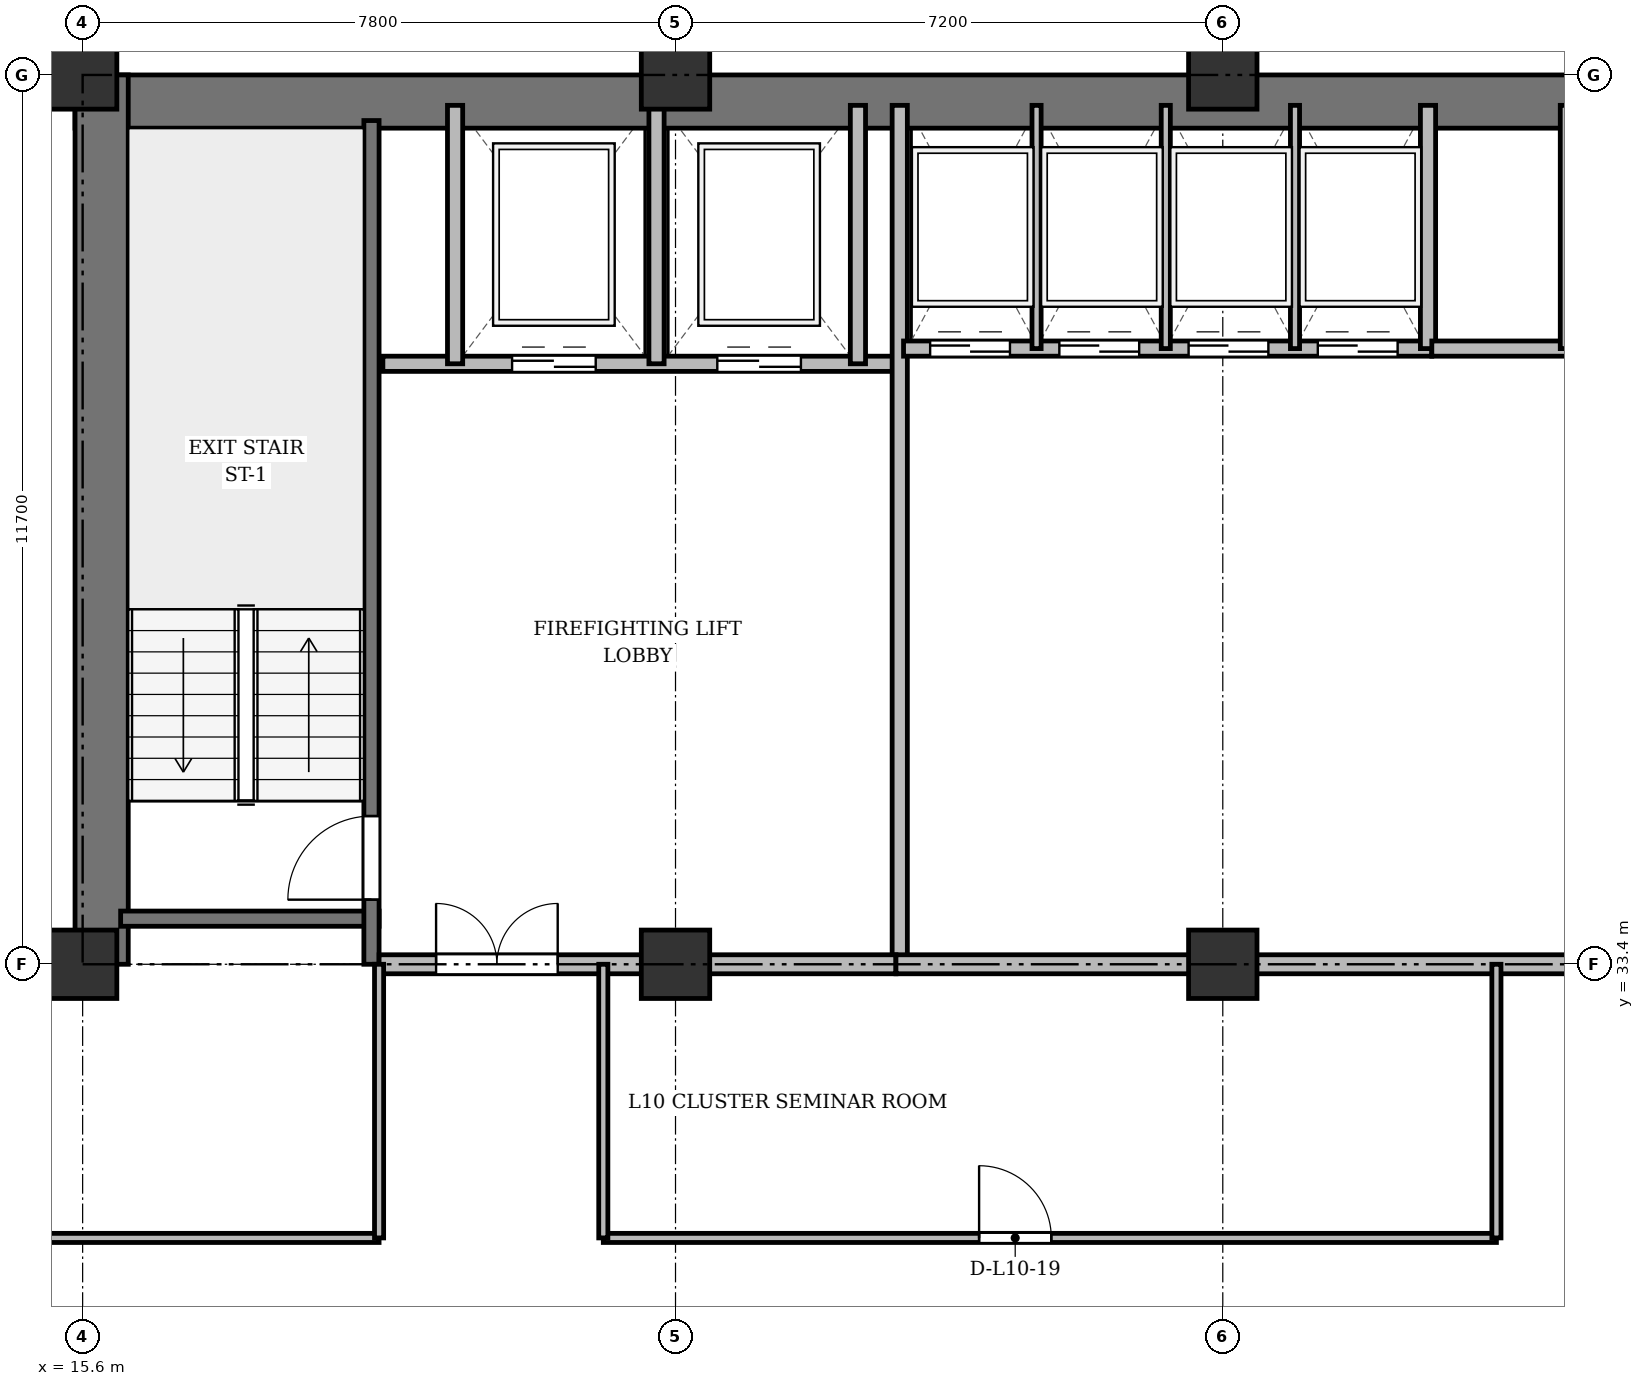
"""IFC4 building model, lengths in metres.
Left out: names, types, materials, properties, quantities, classifications, styles, units other than length and angle.
Written with IfcOpenShell. Run it as: python <this file> out.ifc"""

import sys

from ifc_helpers import new_model, si_unit, direction, frame, frame_2d, origin, origin_2d, place, context, subcontext, project, spatial, rectangle, extrude, source, transform, mapped, element, fill, save


model = new_model("IFC4")
c1 = context("Model", 3, precision=1e-05, world=origin(), true_north=direction((0.0, 1.0)))
c2 = subcontext(c1, "Body", "Model", "MODEL_VIEW")
j1 = project(units=[si_unit("LENGTHUNIT", "METRE"), si_unit("PLANEANGLEUNIT", "RADIAN")], contexts=[c1])
p1 = place(None, origin())
s1 = spatial("IfcSite", under=j1, at=p1, CompositionType="ELEMENT")
p2 = place(p1, origin())
s2 = spatial("IfcBuilding", under=s1, at=p2, CompositionType="ELEMENT")
p3 = place(p2, frame((0.0, 0.0, 41.5)))
s3 = spatial("IfcBuildingStorey", under=s2, at=p3, CompositionType="ELEMENT", Elevation=41.5)
m1 = source(origin(), c2, "Body", "SweptSolid", [
    extrude(rectangle(XDim=0.9, YDim=0.9, at=origin_2d()), origin(), (0.0, 0.0, 1.0), 3.6),
])
for number, where, z_axis, x_axis in (
    (1, (15.6, 33.4, 0.0), (0.0, 0.0, 1.0), (1.0, 0.0, 0.0)),
    (2, (15.6, 45.1, 0.0), (0.0, 0.0, 1.0), (1.0, 0.0, 0.0)),
    (3, (23.4, 33.4, 0.0), (0.0, 0.0, 1.0), (1.0, 0.0, 0.0)),
    (4, (23.4, 45.1, 0.0), (0.0, 0.0, 1.0), (1.0, 0.0, 0.0)),
    (5, (30.6, 33.4, 0.0), (0.0, 0.0, 1.0), (1.0, 0.0, 0.0)),
    (6, (30.6, 45.1, 0.0), (0.0, 0.0, 1.0), (1.0, 0.0, 0.0)),
):
    element("IfcColumn", number, at=place(p3, frame(where, z_axis=z_axis, x_axis=x_axis)), inside=s3, PredefinedType="COLUMN", context=c2, shape_type="MappedRepresentation", body=[
        mapped(m1, transform((0.0, 0.0, 0.0), x_axis=(1.0, 0.0, 0.0), y_axis=(0.0, 1.0, 0.0), z_axis=(0.0, 0.0, 1.0), scale=1.0)),
    ])
p4 = place(p3, frame((15.5, 44.75, 0.0), z_axis=(0.0, 0.0, 1.0), x_axis=(1.0, 0.0, 0.0)))
e7 = element("IfcWall", 7, at=p4, inside=s3, PredefinedType="SHEAR", context=c2, shape_type="SweptSolid", body=[
    extrude(rectangle(XDim=43.4, YDim=0.7, at=frame_2d((21.7, 0.0))), origin(), (0.0, 0.0, 1.0), 3.34),
])
p5 = place(p3, frame((15.85, 33.4, 0.0), z_axis=(0.0, 0.0, 1.0), x_axis=(0.0, 1.0, 0.0)))
e8 = element("IfcWall", 8, at=p5, inside=s3, PredefinedType="SHEAR", context=c2, shape_type="SweptSolid", body=[
    extrude(rectangle(XDim=11.7, YDim=0.7, at=frame_2d((5.85, 0.0))), origin(), (0.0, 0.0, 1.0), 3.34),
])
p6 = place(p3, frame((16.1, 34.0, 0.0), z_axis=(0.0, 0.0, 1.0), x_axis=(1.0, 0.0, 0.0)))
e9 = element("IfcWall", 9, at=p6, inside=s3, PredefinedType="SHEAR", context=c2, shape_type="SweptSolid", body=[
    extrude(rectangle(XDim=3.4, YDim=0.2, at=frame_2d((1.7, 0.0))), origin(), (0.0, 0.0, 1.0), 3.34),
])
p7 = place(p3, frame((19.4, 33.4, 0.0), z_axis=(0.0, 0.0, 1.0), x_axis=(0.0, 1.0, 0.0)))
e10 = element("IfcWall", 10, at=p7, inside=s3, PredefinedType="SHEAR", context=c2, shape_type="SweptSolid", body=[
    extrude(rectangle(XDim=11.1, YDim=0.2, at=frame_2d((5.55, 0.0))), origin(), (0.0, 0.0, 1.0), 3.34),
])
p8 = place(p7, frame((0.85, 0.0, 0.0)))
e11 = element("IfcOpeningElement", 11, at=p8, cuts=e10, PredefinedType="OPENING", context=c2, shape_type="SweptSolid", body=[
    extrude(rectangle(XDim=1.1, YDim=2.15, at=frame_2d((0.55, 1.075))), frame((0.0, 0.11, 0.0), z_axis=(0.0, -1.0, 0.0), x_axis=(1.0, 0.0, 0.0)), (0.0, 0.0, 1.0), 0.22),
])
p9 = place(p3, frame((19.55, 41.3, 0.0), z_axis=(0.0, 0.0, 1.0), x_axis=(1.0, 0.0, 0.0)))
e12 = element("IfcWall", 12, at=p9, inside=s3, PredefinedType="SOLIDWALL", context=c2, shape_type="SweptSolid", body=[
    extrude(rectangle(XDim=6.75, YDim=0.2, at=frame_2d((3.375, 0.0))), origin(), (0.0, 0.0, 1.0), 3.34),
])
p10 = place(p9, frame((1.7, 0.0, 0.0)))
e13 = element("IfcOpeningElement", 13, at=p10, cuts=e12, PredefinedType="OPENING", context=c2, shape_type="SweptSolid", body=[
    extrude(rectangle(XDim=1.1, YDim=2.15, at=frame_2d((0.55, 1.075))), frame((0.0, 0.11, 0.0), z_axis=(0.0, -1.0, 0.0), x_axis=(1.0, 0.0, 0.0)), (0.0, 0.0, 1.0), 0.22),
])
p11 = place(p9, frame((4.4, 0.0, 0.0)))
e14 = element("IfcOpeningElement", 14, at=p11, cuts=e12, PredefinedType="OPENING", context=c2, shape_type="SweptSolid", body=[
    extrude(rectangle(XDim=1.1, YDim=2.15, at=frame_2d((0.55, 1.075))), frame((0.0, 0.11, 0.0), z_axis=(0.0, -1.0, 0.0), x_axis=(1.0, 0.0, 0.0)), (0.0, 0.0, 1.0), 0.22),
])
for number, where, z_axis, x_axis in (
    (15, (20.5, 41.3, 0.0), (0.0, 0.0, 1.0), (0.0, 1.0, 0.0)),
    (16, (23.15, 41.3, 0.0), (0.0, 0.0, 1.0), (0.0, 1.0, 0.0)),
    (17, (25.8, 41.3, 0.0), (0.0, 0.0, 1.0), (0.0, 1.0, 0.0)),
):
    element("IfcWall", number, at=place(p3, frame(where, z_axis=z_axis, x_axis=x_axis)), inside=s3, PredefinedType="SOLIDWALL", context=c2, shape_type="SweptSolid", body=[
        extrude(rectangle(XDim=3.4, YDim=0.2, at=frame_2d((1.7, 0.0))), origin(), (0.0, 0.0, 1.0), 3.34),
    ])
p12 = place(p3, frame((26.35, 33.4, 0.0), z_axis=(0.0, 0.0, 1.0), x_axis=(0.0, 1.0, 0.0)))
e18 = element("IfcWall", 18, at=p12, inside=s3, PredefinedType="SOLIDWALL", context=c2, shape_type="SweptSolid", body=[
    extrude(rectangle(XDim=11.3, YDim=0.2, at=frame_2d((5.65, 0.0))), origin(), (0.0, 0.0, 1.0), 2.69),
])
p13 = place(p3, frame((19.5, 33.4, 0.0), z_axis=(0.0, 0.0, 1.0), x_axis=(1.0, 0.0, 0.0)))
e19 = element("IfcWall", 19, at=p13, inside=s3, PredefinedType="PARTITIONING", context=c2, shape_type="SweptSolid", body=[
    extrude(rectangle(XDim=6.8, YDim=0.25, at=frame_2d((3.4, 0.0))), origin(), (0.0, 0.0, 1.0), 2.69),
])
p14 = place(p13, frame((0.75, 0.0, 0.0)))
e20 = element("IfcOpeningElement", 20, at=p14, cuts=e19, PredefinedType="OPENING", context=c2, shape_type="SweptSolid", body=[
    extrude(rectangle(XDim=1.6, YDim=2.2, at=frame_2d((0.8, 1.1))), frame((0.0, 0.135, 0.0), z_axis=(0.0, -1.0, 0.0), x_axis=(1.0, 0.0, 0.0)), (0.0, 0.0, 1.0), 0.27),
])
p15 = place(p3, frame((26.4, 41.5, 0.0), z_axis=(0.0, 0.0, 1.0), x_axis=(1.0, 0.0, 0.0)))
e21 = element("IfcWall", 21, at=p15, inside=s3, PredefinedType="SOLIDWALL", context=c2, shape_type="SweptSolid", body=[
    extrude(rectangle(XDim=6.95, YDim=0.2, at=frame_2d((3.475, 0.0))), origin(), (0.0, 0.0, 1.0), 3.34),
])
p16 = place(p15, frame((0.35, 0.0, 0.0)))
e22 = element("IfcOpeningElement", 22, at=p16, cuts=e21, PredefinedType="OPENING", context=c2, shape_type="SweptSolid", body=[
    extrude(rectangle(XDim=1.05, YDim=2.15, at=frame_2d((0.525, 1.075))), frame((0.0, 0.11, 0.0), z_axis=(0.0, -1.0, 0.0), x_axis=(1.0, 0.0, 0.0)), (0.0, 0.0, 1.0), 0.22),
])
p17 = place(p15, frame((2.05, 0.0, 0.0)))
e23 = element("IfcOpeningElement", 23, at=p17, cuts=e21, PredefinedType="OPENING", context=c2, shape_type="SweptSolid", body=[
    extrude(rectangle(XDim=1.05, YDim=2.15, at=frame_2d((0.525, 1.075))), frame((0.0, 0.11, 0.0), z_axis=(0.0, -1.0, 0.0), x_axis=(1.0, 0.0, 0.0)), (0.0, 0.0, 1.0), 0.22),
])
p18 = place(p15, frame((3.75, 0.0, 0.0)))
e24 = element("IfcOpeningElement", 24, at=p18, cuts=e21, PredefinedType="OPENING", context=c2, shape_type="SweptSolid", body=[
    extrude(rectangle(XDim=1.05, YDim=2.15, at=frame_2d((0.525, 1.075))), frame((0.0, 0.11, 0.0), z_axis=(0.0, -1.0, 0.0), x_axis=(1.0, 0.0, 0.0)), (0.0, 0.0, 1.0), 0.22),
])
p19 = place(p15, frame((5.45, 0.0, 0.0)))
e25 = element("IfcOpeningElement", 25, at=p19, cuts=e21, PredefinedType="OPENING", context=c2, shape_type="SweptSolid", body=[
    extrude(rectangle(XDim=1.05, YDim=2.15, at=frame_2d((0.525, 1.075))), frame((0.0, 0.11, 0.0), z_axis=(0.0, -1.0, 0.0), x_axis=(1.0, 0.0, 0.0)), (0.0, 0.0, 1.0), 0.22),
])
p20 = place(p3, frame((33.3, 41.5, 0.0), z_axis=(0.0, 0.0, 1.0), x_axis=(0.0, 1.0, 0.0)))
e26 = element("IfcWall", 26, at=p20, inside=s3, PredefinedType="SOLIDWALL", context=c2, shape_type="SweptSolid", body=[
    extrude(rectangle(XDim=3.2, YDim=0.2, at=frame_2d((1.6, 0.0))), origin(), (0.0, 0.0, 1.0), 3.34),
])
for number, where, z_axis, x_axis in (
    (27, (28.15, 41.5, 0.0), (0.0, 0.0, 1.0), (0.0, 1.0, 0.0)),
    (28, (29.85, 41.5, 0.0), (0.0, 0.0, 1.0), (0.0, 1.0, 0.0)),
    (29, (31.55, 41.5, 0.0), (0.0, 0.0, 1.0), (0.0, 1.0, 0.0)),
):
    element("IfcWall", number, at=place(p3, frame(where, z_axis=z_axis, x_axis=x_axis)), inside=s3, PredefinedType="PARTITIONING", context=c2, shape_type="SweptSolid", body=[
        extrude(rectangle(XDim=3.2, YDim=0.12, at=frame_2d((1.6, 0.0))), origin(), (0.0, 0.0, 1.0), 3.34),
    ])
p21 = place(p3, frame((33.35, 41.5, 0.0), z_axis=(0.0, 0.0, 1.0), x_axis=(1.0, 0.0, 0.0)))
e30 = element("IfcWall", 30, at=p21, inside=s3, PredefinedType="SOLIDWALL", context=c2, shape_type="SweptSolid", body=[
    extrude(rectangle(XDim=6.9, YDim=0.2, at=frame_2d((3.45, 0.0))), origin(), (0.0, 0.0, 1.0), 3.34),
])
p22 = place(p3, frame((35.1, 41.5, 0.0), z_axis=(0.0, 0.0, 1.0), x_axis=(0.0, 1.0, 0.0)))
e31 = element("IfcWall", 31, at=p22, inside=s3, PredefinedType="PARTITIONING", context=c2, shape_type="SweptSolid", body=[
    extrude(rectangle(XDim=3.2, YDim=0.12, at=frame_2d((1.6, 0.0))), origin(), (0.0, 0.0, 1.0), 3.34),
])
p23 = place(p3, frame((26.3, 33.4, 0.0), z_axis=(0.0, 0.0, 1.0), x_axis=(1.0, 0.0, 0.0)))
e32 = element("IfcWall", 32, at=p23, inside=s3, PredefinedType="PARTITIONING", context=c2, shape_type="SweptSolid", body=[
    extrude(rectangle(XDim=20.85, YDim=0.25, at=frame_2d((10.425, 0.0))), origin(), (0.0, 0.0, 1.0), 2.69),
])
p24 = place(p23, frame((9.2, 0.0, 0.0)))
e33 = element("IfcOpeningElement", 33, at=p24, cuts=e32, PredefinedType="OPENING", context=c2, shape_type="SweptSolid", body=[
    extrude(rectangle(XDim=1.6, YDim=2.2, at=frame_2d((0.8, 1.1))), frame((0.0, 0.135, 0.0), z_axis=(0.0, -1.0, 0.0), x_axis=(1.0, 0.0, 0.0)), (0.0, 0.0, 1.0), 0.27),
])
p25 = place(p3, frame((4.75, 29.8, 0.0), z_axis=(0.0, 0.0, 1.0), x_axis=(1.0, 0.0, 0.0)))
e34 = element("IfcWall", 34, at=p25, inside=s3, PredefinedType="PARTITIONING", context=c2, shape_type="SweptSolid", body=[
    extrude(rectangle(XDim=14.75, YDim=0.12, at=frame_2d((7.375, 0.0))), origin(), (0.0, 0.0, 1.0), 2.752),
])
p26 = place(p25, frame((6.9, 0.0, 0.0)))
e35 = element("IfcOpeningElement", 35, at=p26, cuts=e34, PredefinedType="OPENING", context=c2, shape_type="SweptSolid", body=[
    extrude(rectangle(XDim=0.95, YDim=2.15, at=frame_2d((0.475, 1.075))), frame((0.0, 0.07, 0.0), z_axis=(0.0, -1.0, 0.0), x_axis=(1.0, 0.0, 0.0)), (0.0, 0.0, 1.0), 0.14),
])
p27 = place(p3, frame((22.45, 29.8, 0.0), z_axis=(0.0, 0.0, 1.0), x_axis=(1.0, 0.0, 0.0)))
e36 = element("IfcWall", 36, at=p27, inside=s3, PredefinedType="PARTITIONING", context=c2, shape_type="SweptSolid", body=[
    extrude(rectangle(XDim=11.75, YDim=0.12, at=frame_2d((5.875, 0.0))), origin(), (0.0, 0.0, 1.0), 2.752),
])
p28 = place(p27, frame((4.944, 0.0, 0.0)))
e37 = element("IfcOpeningElement", 37, at=p28, cuts=e36, PredefinedType="OPENING", context=c2, shape_type="SweptSolid", body=[
    extrude(rectangle(XDim=0.95, YDim=2.15, at=frame_2d((0.475, 1.075))), frame((0.0, 0.07, 0.0), z_axis=(0.0, -1.0, 0.0), x_axis=(1.0, 0.0, 0.0)), (0.0, 0.0, 1.0), 0.14),
])
for number, where, z_axis, x_axis in (
    (38, (19.5, 29.8, 0.0), (0.0, 0.0, 1.0), (0.0, 1.0, 0.0)),
    (39, (22.45, 29.8, 0.0), (0.0, 0.0, 1.0), (0.0, 1.0, 0.0)),
    (40, (34.2, 29.8, 0.0), (0.0, 0.0, 1.0), (0.0, 1.0, 0.0)),
):
    element("IfcWall", number, at=place(p3, frame(where, z_axis=z_axis, x_axis=x_axis)), inside=s3, PredefinedType="PARTITIONING", context=c2, shape_type="SweptSolid", body=[
        extrude(rectangle(XDim=3.6, YDim=0.12, at=frame_2d((1.8, 0.0))), origin(), (0.0, 0.0, 1.0), 2.69),
    ])
p29 = place(p3, frame((4.75, 33.4, 0.0), z_axis=(0.0, 0.0, 1.0), x_axis=(1.0, 0.0, 0.0)))
e41 = element("IfcWall", 41, at=p29, inside=s3, PredefinedType="PARTITIONING", context=c2, shape_type="SweptSolid", body=[
    extrude(rectangle(XDim=10.85, YDim=0.15, at=frame_2d((5.425, 0.0))), origin(), (0.0, 0.0, 1.0), 2.69),
])
p30 = place(p29, frame((4.94, 0.0, 0.0)))
e42 = element("IfcOpeningElement", 42, at=p30, cuts=e41, PredefinedType="OPENING", context=c2, shape_type="SweptSolid", body=[
    extrude(rectangle(XDim=0.95, YDim=2.15, at=frame_2d((0.475, 1.075))), frame((0.0, 0.085, 0.0), z_axis=(0.0, -1.0, 0.0), x_axis=(1.0, 0.0, 0.0)), (0.0, 0.0, 1.0), 0.17),
])
p31 = place(p3, frame((15.6, 44.75, 0.0), z_axis=(0.0, 0.0, 1.0), x_axis=(0.0, 1.0, 0.0)))
e43 = element("IfcWall", 43, at=p31, inside=s3, PredefinedType="PARTITIONING", context=c2, shape_type="SweptSolid", body=[
    extrude(rectangle(XDim=3.61, YDim=0.15, at=frame_2d((1.805, 0.0))), origin(), (0.0, 0.0, 1.0), 2.752),
])
p32 = place(p31, frame((1.1, 0.0, 0.0)))
e44 = element("IfcOpeningElement", 44, at=p32, cuts=e43, PredefinedType="OPENING", context=c2, shape_type="SweptSolid", body=[
    extrude(rectangle(XDim=0.95, YDim=2.15, at=frame_2d((0.475, 1.075))), frame((0.0, 0.085, 0.0), z_axis=(0.0, -1.0, 0.0), x_axis=(1.0, 0.0, 0.0)), (0.0, 0.0, 1.0), 0.17),
])
m2 = source(origin(), c2, "Body", "SweptSolid", [
    extrude(rectangle(XDim=1.1, YDim=2.15, at=frame_2d((0.55, 1.075))), frame((0.0, 0.025, 0.0), z_axis=(0.0, -1.0, 0.0), x_axis=(1.0, 0.0, 0.0)), (0.0, 0.0, 1.0), 0.05),
])
p33 = place(p8, origin())
e45 = element("IfcDoor", 45, at=p33, inside=s3, OperationType="SINGLE_SWING_LEFT", PredefinedType="DOOR", context=c2, shape_type="MappedRepresentation", body=[
    mapped(m2, transform((0.0, 0.0, 0.0), x_axis=(1.0, 0.0, 0.0), y_axis=(0.0, 1.0, 0.0), z_axis=(0.0, 0.0, 1.0), scale=1.0)),
])
fill(e11, e45)
p34 = place(p10, origin())
e46 = element("IfcDoor", 46, at=p34, inside=s3, OperationType="DOUBLE_DOOR_SLIDING", PredefinedType="DOOR", context=c2, shape_type="MappedRepresentation", body=[
    mapped(m2, transform((0.0, 0.0, 0.0), x_axis=(1.0, 0.0, 0.0), y_axis=(0.0, 1.0, 0.0), z_axis=(0.0, 0.0, 1.0), scale=1.0)),
])
fill(e13, e46)
p35 = place(p11, origin())
e47 = element("IfcDoor", 47, at=p35, inside=s3, OperationType="DOUBLE_DOOR_SLIDING", PredefinedType="DOOR", context=c2, shape_type="MappedRepresentation", body=[
    mapped(m2, transform((0.0, 0.0, 0.0), x_axis=(1.0, 0.0, 0.0), y_axis=(0.0, 1.0, 0.0), z_axis=(0.0, 0.0, 1.0), scale=1.0)),
])
fill(e14, e47)
m3 = source(origin(), c2, "Body", "SweptSolid", [
    extrude(rectangle(XDim=1.6, YDim=2.2, at=frame_2d((0.8, 1.1))), frame((0.0, 0.025, 0.0), z_axis=(0.0, -1.0, 0.0), x_axis=(1.0, 0.0, 0.0)), (0.0, 0.0, 1.0), 0.05),
])
p36 = place(p14, origin())
e48 = element("IfcDoor", 48, at=p36, inside=s3, OperationType="DOUBLE_DOOR_SINGLE_SWING", PredefinedType="DOOR", context=c2, shape_type="MappedRepresentation", body=[
    mapped(m3, transform((0.0, 0.0, 0.0), x_axis=(1.0, 0.0, 0.0), y_axis=(0.0, 1.0, 0.0), z_axis=(0.0, 0.0, 1.0), scale=1.0)),
])
fill(e20, e48)
m4 = source(origin(), c2, "Body", "SweptSolid", [
    extrude(rectangle(XDim=1.05, YDim=2.15, at=frame_2d((0.525, 1.075))), frame((0.0, 0.025, 0.0), z_axis=(0.0, -1.0, 0.0), x_axis=(1.0, 0.0, 0.0)), (0.0, 0.0, 1.0), 0.05),
])
p37 = place(p16, origin())
e49 = element("IfcDoor", 49, at=p37, inside=s3, OperationType="DOUBLE_DOOR_SLIDING", PredefinedType="DOOR", context=c2, shape_type="MappedRepresentation", body=[
    mapped(m4, transform((0.0, 0.0, 0.0), x_axis=(1.0, 0.0, 0.0), y_axis=(0.0, 1.0, 0.0), z_axis=(0.0, 0.0, 1.0), scale=1.0)),
])
fill(e22, e49)
p38 = place(p17, origin())
e50 = element("IfcDoor", 50, at=p38, inside=s3, OperationType="DOUBLE_DOOR_SLIDING", PredefinedType="DOOR", context=c2, shape_type="MappedRepresentation", body=[
    mapped(m4, transform((0.0, 0.0, 0.0), x_axis=(1.0, 0.0, 0.0), y_axis=(0.0, 1.0, 0.0), z_axis=(0.0, 0.0, 1.0), scale=1.0)),
])
fill(e23, e50)
p39 = place(p18, origin())
e51 = element("IfcDoor", 51, at=p39, inside=s3, OperationType="DOUBLE_DOOR_SLIDING", PredefinedType="DOOR", context=c2, shape_type="MappedRepresentation", body=[
    mapped(m4, transform((0.0, 0.0, 0.0), x_axis=(1.0, 0.0, 0.0), y_axis=(0.0, 1.0, 0.0), z_axis=(0.0, 0.0, 1.0), scale=1.0)),
])
fill(e24, e51)
p40 = place(p19, origin())
e52 = element("IfcDoor", 52, at=p40, inside=s3, OperationType="DOUBLE_DOOR_SLIDING", PredefinedType="DOOR", context=c2, shape_type="MappedRepresentation", body=[
    mapped(m4, transform((0.0, 0.0, 0.0), x_axis=(1.0, 0.0, 0.0), y_axis=(0.0, 1.0, 0.0), z_axis=(0.0, 0.0, 1.0), scale=1.0)),
])
fill(e25, e52)
m5 = source(origin(), c2, "Body", "SweptSolid", [
    extrude(rectangle(XDim=0.95, YDim=2.15, at=frame_2d((0.475, 1.075))), frame((0.0, 0.025, 0.0), z_axis=(0.0, -1.0, 0.0), x_axis=(1.0, 0.0, 0.0)), (0.0, 0.0, 1.0), 0.05),
])
p41 = place(p28, origin())
e53 = element("IfcDoor", 53, at=p41, inside=s3, OperationType="SINGLE_SWING_LEFT", PredefinedType="DOOR", context=c2, shape_type="MappedRepresentation", body=[
    mapped(m5, transform((0.0, 0.0, 0.0), x_axis=(1.0, 0.0, 0.0), y_axis=(0.0, 1.0, 0.0), z_axis=(0.0, 0.0, 1.0), scale=1.0)),
])
fill(e37, e53)
save(model, sys.argv[1])
